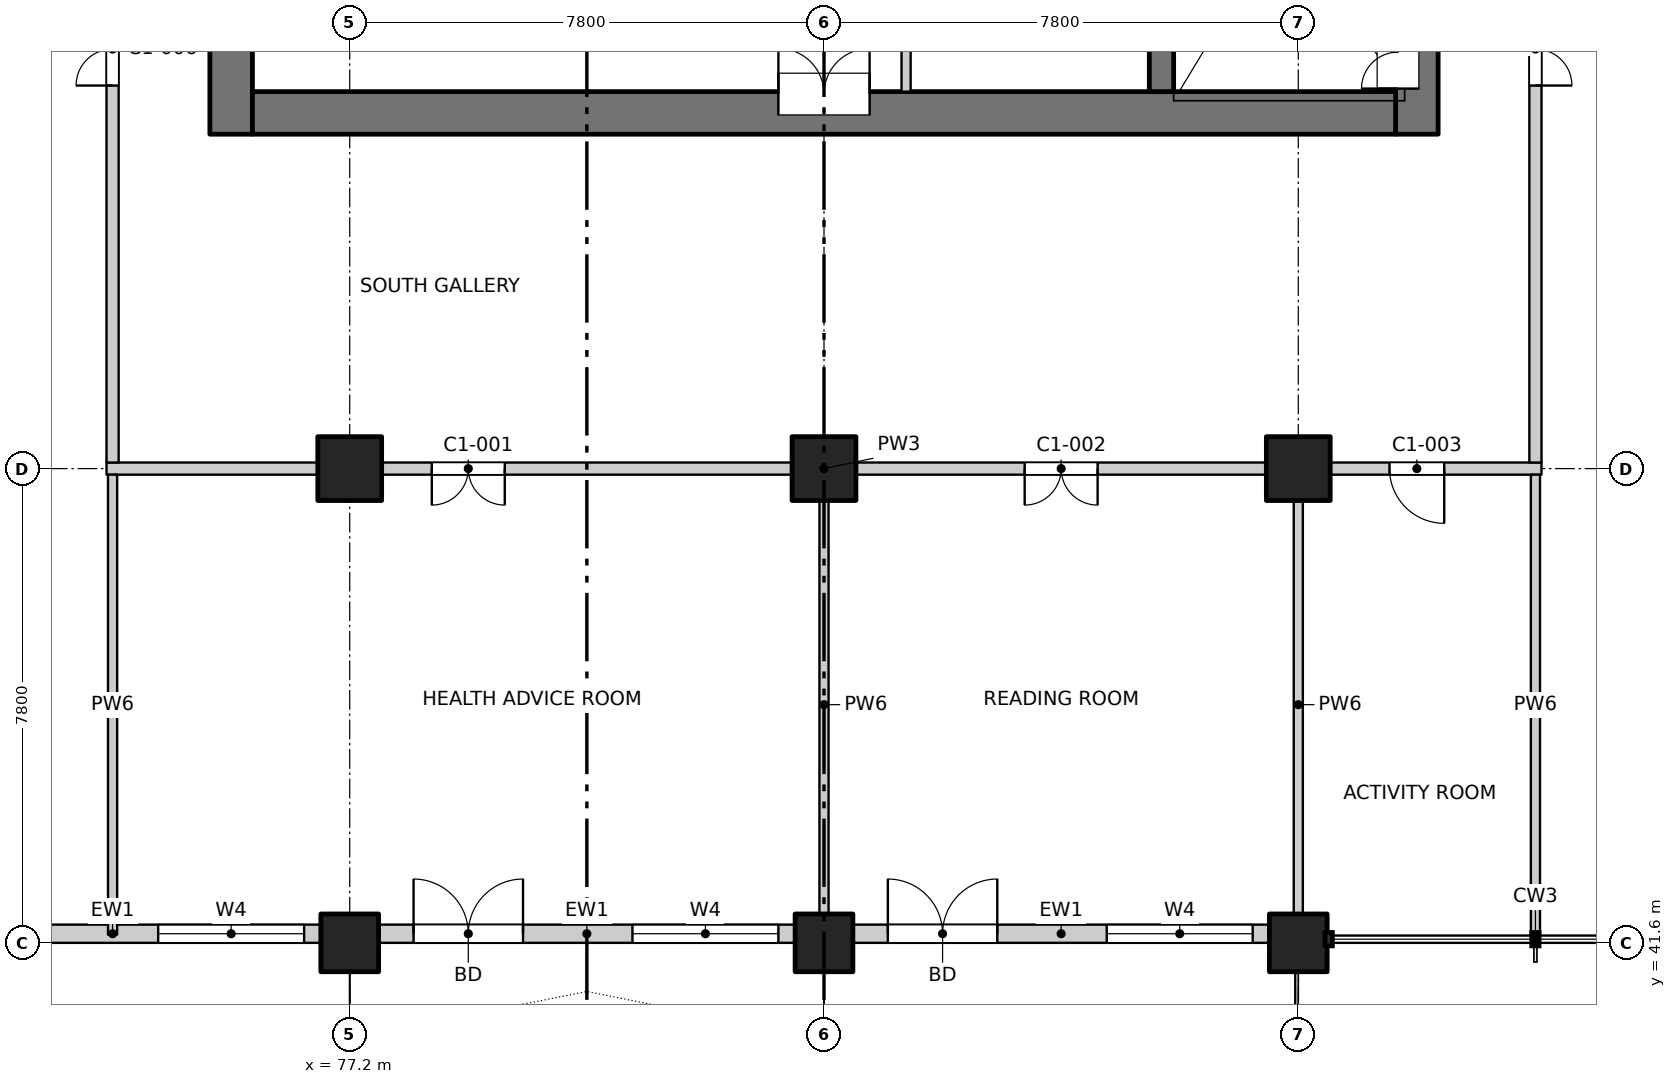
"""IFC4 building model, lengths in metres.
Left out: names, types, materials, properties, quantities, classifications, styles, units other than length and angle.
Written with IfcOpenShell. Run it as: python <this file> out.ifc"""

import sys

from ifc_helpers import new_model, si_unit, direction, frame, frame_2d, origin, origin_2d, place, context, subcontext, project, spatial, rectangle, extrude, element, fill, save


model = new_model("IFC4")
c1 = context("Model", 3, precision=1e-05, world=origin(), true_north=direction((0.0, 1.0)))
c2 = subcontext(c1, "Body", "Model", "MODEL_VIEW")
j1 = project(units=[si_unit("LENGTHUNIT", "METRE"), si_unit("PLANEANGLEUNIT", "RADIAN")], contexts=[c1])
p1 = place(None, origin())
s1 = spatial("IfcSite", under=j1, at=p1, CompositionType="ELEMENT")
p2 = place(p1, origin())
s2 = spatial("IfcBuilding", under=s1, at=p2, CompositionType="ELEMENT")
p3 = place(p2, frame((0.0, 0.0, 71.6)))
s3 = spatial("IfcBuildingStorey", under=s2, at=p3, CompositionType="ELEMENT", Elevation=71.6)
for number, where, z_axis, x_axis in (
    (1, (77.2, 41.6, -0.25), (0.0, 0.0, 1.0), (1.0, 0.0, 0.0)),
    (2, (85.0, 41.6, -0.25), (0.0, 0.0, 1.0), (1.0, 0.0, 0.0)),
    (3, (92.8, 41.6, -0.25), (0.0, 0.0, 1.0), (1.0, 0.0, 0.0)),
):
    element("IfcColumn", number, at=place(p3, frame(where, z_axis=z_axis, x_axis=x_axis)), inside=s3, PredefinedType="COLUMN", context=c2, shape_type="SweptSolid", body=[
        extrude(rectangle(XDim=0.95, YDim=0.95, at=origin_2d()), origin(), (0.0, 0.0, 1.0), 3.4),
    ])
for number, where, z_axis, x_axis in (
    (4, (77.2, 49.4, -0.25), (0.0, 0.0, 1.0), (1.0, 0.0, 0.0)),
    (5, (85.0, 49.4, -0.25), (0.0, 0.0, 1.0), (1.0, 0.0, 0.0)),
    (6, (92.8, 49.4, -0.25), (0.0, 0.0, 1.0), (1.0, 0.0, 0.0)),
):
    element("IfcColumn", number, at=place(p3, frame(where, z_axis=z_axis, x_axis=x_axis)), inside=s3, PredefinedType="COLUMN", context=c2, shape_type="SweptSolid", body=[
        extrude(rectangle(XDim=1.05, YDim=1.05, at=origin_2d()), origin(), (0.0, 0.0, 1.0), 3.4),
    ])
p4 = place(p3, frame((75.25, 54.9, -0.25), z_axis=(0.0, 0.0, 1.0), x_axis=(0.0, 1.0, 0.0)))
e7 = element("IfcWall", 7, at=p4, inside=s3, PredefinedType="SOLIDWALL", context=c2, shape_type="SweptSolid", body=[
    extrude(rectangle(XDim=22.4, YDim=0.7, at=frame_2d((11.2, 0.0))), origin(), (0.0, 0.0, 1.0), 3.4),
])
p5 = place(p4, frame((7.55, 0.0, 0.25)))
e8 = element("IfcOpeningElement", 8, at=p5, cuts=e7, PredefinedType="OPENING", context=c2, shape_type="SweptSolid", body=[
    extrude(rectangle(XDim=0.9, YDim=2.1, at=frame_2d((0.45, 1.05))), frame((0.0, 0.36, 0.0), z_axis=(0.0, -1.0, 0.0), x_axis=(1.0, 0.0, 0.0)), (0.0, 0.0, 1.0), 0.72),
])
p6 = place(p4, frame((10.85, 0.0, 0.25)))
e9 = element("IfcOpeningElement", 9, at=p6, cuts=e7, PredefinedType="OPENING", context=c2, shape_type="SweptSolid", body=[
    extrude(rectangle(XDim=0.9, YDim=2.1, at=frame_2d((0.45, 1.05))), frame((0.0, 0.36, 0.0), z_axis=(0.0, -1.0, 0.0), x_axis=(1.0, 0.0, 0.0)), (0.0, 0.0, 1.0), 0.72),
])
p7 = place(p4, frame((13.85, 0.0, 0.25)))
e10 = element("IfcOpeningElement", 10, at=p7, cuts=e7, PredefinedType="OPENING", context=c2, shape_type="SweptSolid", body=[
    extrude(rectangle(XDim=0.9, YDim=2.1, at=frame_2d((0.45, 1.05))), frame((0.0, 0.36, 0.0), z_axis=(0.0, -1.0, 0.0), x_axis=(1.0, 0.0, 0.0)), (0.0, 0.0, 1.0), 0.72),
])
p8 = place(p4, frame((16.85, 0.0, 0.25)))
e11 = element("IfcOpeningElement", 11, at=p8, cuts=e7, PredefinedType="OPENING", context=c2, shape_type="SweptSolid", body=[
    extrude(rectangle(XDim=0.9, YDim=2.1, at=frame_2d((0.45, 1.05))), frame((0.0, 0.36, 0.0), z_axis=(0.0, -1.0, 0.0), x_axis=(1.0, 0.0, 0.0)), (0.0, 0.0, 1.0), 0.72),
])
p9 = place(p4, frame((20.15, 0.0, 0.25)))
e12 = element("IfcOpeningElement", 12, at=p9, cuts=e7, PredefinedType="OPENING", context=c2, shape_type="SweptSolid", body=[
    extrude(rectangle(XDim=0.9, YDim=2.1, at=frame_2d((0.45, 1.05))), frame((0.0, 0.36, 0.0), z_axis=(0.0, -1.0, 0.0), x_axis=(1.0, 0.0, 0.0)), (0.0, 0.0, 1.0), 0.72),
])
p10 = place(p3, frame((94.75, 54.9, -0.25), z_axis=(0.0, 0.0, 1.0), x_axis=(0.0, 1.0, 0.0)))
e13 = element("IfcWall", 13, at=p10, inside=s3, PredefinedType="SOLIDWALL", context=c2, shape_type="SweptSolid", body=[
    extrude(rectangle(XDim=7.05, YDim=0.7, at=frame_2d((3.525, 0.0))), origin(), (0.0, 0.0, 1.0), 3.4),
])
p11 = place(p10, frame((0.75, 0.0, 0.25)))
e14 = element("IfcOpeningElement", 14, at=p11, cuts=e13, PredefinedType="OPENING", context=c2, shape_type="SweptSolid", body=[
    extrude(rectangle(XDim=1.2, YDim=2.1, at=frame_2d((0.6, 1.05))), frame((0.0, 0.36, 0.0), z_axis=(0.0, -1.0, 0.0), x_axis=(1.0, 0.0, 0.0)), (0.0, 0.0, 1.0), 0.72),
])
p12 = place(p3, frame((75.6, 55.25, -0.25), z_axis=(0.0, 0.0, 1.0), x_axis=(1.0, 0.0, 0.0)))
e15 = element("IfcWall", 15, at=p12, inside=s3, PredefinedType="SOLIDWALL", context=c2, shape_type="SweptSolid", body=[
    extrude(rectangle(XDim=18.8, YDim=0.7, at=frame_2d((9.4, 0.0))), origin(), (0.0, 0.0, 1.0), 3.4),
])
p13 = place(p12, frame((8.65, 0.0, 0.25)))
e16 = element("IfcOpeningElement", 16, at=p13, cuts=e15, PredefinedType="OPENING", context=c2, shape_type="SweptSolid", body=[
    extrude(rectangle(XDim=1.5, YDim=2.1, at=frame_2d((0.75, 1.05))), frame((0.0, 0.36, 0.0), z_axis=(0.0, -1.0, 0.0), x_axis=(1.0, 0.0, 0.0)), (0.0, 0.0, 1.0), 0.72),
])
p14 = place(p3, frame((90.55, 55.6, -0.25), z_axis=(0.0, 0.0, 1.0), x_axis=(0.0, 1.0, 0.0)))
e17 = element("IfcWall", 17, at=p14, inside=s3, PredefinedType="SOLIDWALL", context=c2, shape_type="SweptSolid", body=[
    extrude(rectangle(XDim=6.35, YDim=0.4, at=frame_2d((3.175, 0.0))), origin(), (0.0, 0.0, 1.0), 3.4),
])
p15 = place(p3, frame((69.875, 41.75, 0.0), z_axis=(0.0, 0.0, 1.0), x_axis=(1.0, 0.0, 0.0)))
e18 = element("IfcWall", 18, at=p15, inside=s3, PredefinedType="SOLIDWALL", context=c2, shape_type="SweptSolid", body=[
    extrude(rectangle(XDim=6.85, YDim=0.3, at=frame_2d((3.425, 0.0))), origin(), (0.0, 0.0, 1.0), 2.7),
])
p16 = place(p15, frame((0.575, 0.0, 0.0)))
e19 = element("IfcOpeningElement", 19, at=p16, cuts=e18, PredefinedType="OPENING", context=c2, shape_type="SweptSolid", body=[
    extrude(rectangle(XDim=1.8, YDim=2.4, at=frame_2d((0.9, 1.2))), frame((0.0, 0.16, 0.0), z_axis=(0.0, -1.0, 0.0), x_axis=(1.0, 0.0, 0.0)), (0.0, 0.0, 1.0), 0.32),
])
p17 = place(p15, frame((4.175, 0.0, 0.6)))
e20 = element("IfcOpeningElement", 20, at=p17, cuts=e18, PredefinedType="OPENING", context=c2, shape_type="SweptSolid", body=[
    extrude(rectangle(XDim=2.4, YDim=2.1, at=frame_2d((1.2, 1.05))), frame((0.0, 0.16, 0.0), z_axis=(0.0, -1.0, 0.0), x_axis=(1.0, 0.0, 0.0)), (0.0, 0.0, 1.0), 0.32),
])
p18 = place(p3, frame((77.675, 41.75, 0.0), z_axis=(0.0, 0.0, 1.0), x_axis=(1.0, 0.0, 0.0)))
e21 = element("IfcWall", 21, at=p18, inside=s3, PredefinedType="SOLIDWALL", context=c2, shape_type="SweptSolid", body=[
    extrude(rectangle(XDim=6.85, YDim=0.3, at=frame_2d((3.425, 0.0))), origin(), (0.0, 0.0, 1.0), 2.7),
])
p19 = place(p18, frame((0.575, 0.0, 0.0)))
e22 = element("IfcOpeningElement", 22, at=p19, cuts=e21, PredefinedType="OPENING", context=c2, shape_type="SweptSolid", body=[
    extrude(rectangle(XDim=1.8, YDim=2.4, at=frame_2d((0.9, 1.2))), frame((0.0, 0.16, 0.0), z_axis=(0.0, -1.0, 0.0), x_axis=(1.0, 0.0, 0.0)), (0.0, 0.0, 1.0), 0.32),
])
p20 = place(p18, frame((4.175, 0.0, 0.6)))
e23 = element("IfcOpeningElement", 23, at=p20, cuts=e21, PredefinedType="OPENING", context=c2, shape_type="SweptSolid", body=[
    extrude(rectangle(XDim=2.4, YDim=2.1, at=frame_2d((1.2, 1.05))), frame((0.0, 0.16, 0.0), z_axis=(0.0, -1.0, 0.0), x_axis=(1.0, 0.0, 0.0)), (0.0, 0.0, 1.0), 0.32),
])
p21 = place(p3, frame((85.475, 41.75, 0.0), z_axis=(0.0, 0.0, 1.0), x_axis=(1.0, 0.0, 0.0)))
e24 = element("IfcWall", 24, at=p21, inside=s3, PredefinedType="SOLIDWALL", context=c2, shape_type="SweptSolid", body=[
    extrude(rectangle(XDim=6.85, YDim=0.3, at=frame_2d((3.425, 0.0))), origin(), (0.0, 0.0, 1.0), 2.7),
])
p22 = place(p21, frame((0.575, 0.0, 0.0)))
e25 = element("IfcOpeningElement", 25, at=p22, cuts=e24, PredefinedType="OPENING", context=c2, shape_type="SweptSolid", body=[
    extrude(rectangle(XDim=1.8, YDim=2.4, at=frame_2d((0.9, 1.2))), frame((0.0, 0.16, 0.0), z_axis=(0.0, -1.0, 0.0), x_axis=(1.0, 0.0, 0.0)), (0.0, 0.0, 1.0), 0.32),
])
p23 = place(p21, frame((4.175, 0.0, 0.6)))
e26 = element("IfcOpeningElement", 26, at=p23, cuts=e24, PredefinedType="OPENING", context=c2, shape_type="SweptSolid", body=[
    extrude(rectangle(XDim=2.4, YDim=2.1, at=frame_2d((1.2, 1.05))), frame((0.0, 0.16, 0.0), z_axis=(0.0, -1.0, 0.0), x_axis=(1.0, 0.0, 0.0)), (0.0, 0.0, 1.0), 0.32),
])
p24 = place(p3, frame((73.2, 49.4, 0.0), z_axis=(0.0, 0.0, 1.0), x_axis=(1.0, 0.0, 0.0)))
e27 = element("IfcWall", 27, at=p24, inside=s3, PredefinedType="PARTITIONING", context=c2, shape_type="SweptSolid", body=[
    extrude(rectangle(XDim=23.6, YDim=0.2, at=frame_2d((11.8, 0.0))), origin(), (0.0, 0.0, 1.0), 3.15),
])
p25 = place(p24, frame((5.35, 0.0, 0.0)))
e28 = element("IfcOpeningElement", 28, at=p25, cuts=e27, PredefinedType="OPENING", context=c2, shape_type="SweptSolid", body=[
    extrude(rectangle(XDim=1.2, YDim=2.1, at=frame_2d((0.6, 1.05))), frame((0.0, 0.11, 0.0), z_axis=(0.0, -1.0, 0.0), x_axis=(1.0, 0.0, 0.0)), (0.0, 0.0, 1.0), 0.22),
])
p26 = place(p24, frame((15.1, 0.0, 0.0)))
e29 = element("IfcOpeningElement", 29, at=p26, cuts=e27, PredefinedType="OPENING", context=c2, shape_type="SweptSolid", body=[
    extrude(rectangle(XDim=1.2, YDim=2.1, at=frame_2d((0.6, 1.05))), frame((0.0, 0.11, 0.0), z_axis=(0.0, -1.0, 0.0), x_axis=(1.0, 0.0, 0.0)), (0.0, 0.0, 1.0), 0.22),
])
p27 = place(p24, frame((21.1, 0.0, 0.0)))
e30 = element("IfcOpeningElement", 30, at=p27, cuts=e27, PredefinedType="OPENING", context=c2, shape_type="SweptSolid", body=[
    extrude(rectangle(XDim=0.9, YDim=2.1, at=frame_2d((0.45, 1.05))), frame((0.0, 0.11, 0.0), z_axis=(0.0, -1.0, 0.0), x_axis=(1.0, 0.0, 0.0)), (0.0, 0.0, 1.0), 0.22),
])
p28 = place(p3, frame((73.3, 41.735, 0.0), z_axis=(0.0, 0.0, 1.0), x_axis=(0.0, 1.0, 0.0)))
e31 = element("IfcWall", 31, at=p28, inside=s3, PredefinedType="PARTITIONING", context=c2, shape_type="SweptSolid", body=[
    extrude(rectangle(XDim=7.565, YDim=0.15, at=frame_2d((3.782, 0.0))), origin(), (0.0, 0.0, 1.0), 3.15),
])
p29 = place(p3, frame((73.3, 49.5, 0.0), z_axis=(0.0, 0.0, 1.0), x_axis=(0.0, 1.0, 0.0)))
e32 = element("IfcWall", 32, at=p29, inside=s3, PredefinedType="PARTITIONING", context=c2, shape_type="SweptSolid", body=[
    extrude(rectangle(XDim=34.9, YDim=0.2, at=frame_2d((17.45, 0.0))), origin(), (0.0, 0.0, 1.0), 3.15),
])
p30 = place(p29, frame((6.2, 0.0, 0.0)))
e33 = element("IfcOpeningElement", 33, at=p30, cuts=e32, PredefinedType="OPENING", context=c2, shape_type="SweptSolid", body=[
    extrude(rectangle(XDim=1.2, YDim=2.1, at=frame_2d((0.6, 1.05))), frame((0.0, 0.11, 0.0), z_axis=(0.0, -1.0, 0.0), x_axis=(1.0, 0.0, 0.0)), (0.0, 0.0, 1.0), 0.22),
])
p31 = place(p29, frame((9.05, 0.0, 0.0)))
e34 = element("IfcOpeningElement", 34, at=p31, cuts=e32, PredefinedType="OPENING", context=c2, shape_type="SweptSolid", body=[
    extrude(rectangle(XDim=1.2, YDim=2.1, at=frame_2d((0.6, 1.05))), frame((0.0, 0.11, 0.0), z_axis=(0.0, -1.0, 0.0), x_axis=(1.0, 0.0, 0.0)), (0.0, 0.0, 1.0), 0.22),
])
p32 = place(p29, frame((24.65, 0.0, 0.0)))
e35 = element("IfcOpeningElement", 35, at=p32, cuts=e32, PredefinedType="OPENING", context=c2, shape_type="SweptSolid", body=[
    extrude(rectangle(XDim=1.2, YDim=2.1, at=frame_2d((0.6, 1.05))), frame((0.0, 0.11, 0.0), z_axis=(0.0, -1.0, 0.0), x_axis=(1.0, 0.0, 0.0)), (0.0, 0.0, 1.0), 0.22),
])
p33 = place(p29, frame((33.579, 0.0, 0.0)))
e36 = element("IfcOpeningElement", 36, at=p33, cuts=e32, PredefinedType="OPENING", context=c2, shape_type="SweptSolid", body=[
    extrude(rectangle(XDim=1.2, YDim=2.1, at=frame_2d((0.6, 1.05))), frame((0.0, 0.11, 0.0), z_axis=(0.0, -1.0, 0.0), x_axis=(1.0, 0.0, 0.0)), (0.0, 0.0, 1.0), 0.22),
])
p34 = place(p3, frame((85.0, 41.735, 0.0), z_axis=(0.0, 0.0, 1.0), x_axis=(0.0, 1.0, 0.0)))
e37 = element("IfcWall", 37, at=p34, inside=s3, PredefinedType="PARTITIONING", context=c2, shape_type="SweptSolid", body=[
    extrude(rectangle(XDim=7.565, YDim=0.15, at=frame_2d((3.782, 0.0))), origin(), (0.0, 0.0, 1.0), 2.55),
])
p35 = place(p3, frame((86.35, 55.6, 0.0), z_axis=(0.0, 0.0, 1.0), x_axis=(0.0, 1.0, 0.0)))
e38 = element("IfcWall", 38, at=p35, inside=s3, PredefinedType="PARTITIONING", context=c2, shape_type="SweptSolid", body=[
    extrude(rectangle(XDim=5.425, YDim=0.15, at=frame_2d((2.712, 0.0))), origin(), (0.0, 0.0, 1.0), 3.15),
])
p36 = place(p35, frame((2.1, 0.0, 0.0)))
e39 = element("IfcOpeningElement", 39, at=p36, cuts=e38, PredefinedType="OPENING", context=c2, shape_type="SweptSolid", body=[
    extrude(rectangle(XDim=0.9, YDim=2.1, at=frame_2d((0.45, 1.05))), frame((0.0, 0.085, 0.0), z_axis=(0.0, -1.0, 0.0), x_axis=(1.0, 0.0, 0.0)), (0.0, 0.0, 1.0), 0.17),
])
p37 = place(p3, frame((92.8, 41.735, 0.0), z_axis=(0.0, 0.0, 1.0), x_axis=(0.0, 1.0, 0.0)))
e40 = element("IfcWall", 40, at=p37, inside=s3, PredefinedType="PARTITIONING", context=c2, shape_type="SweptSolid", body=[
    extrude(rectangle(XDim=7.565, YDim=0.15, at=frame_2d((3.782, 0.0))), origin(), (0.0, 0.0, 1.0), 2.55),
])
p38 = place(p3, frame((96.7, 41.735, 0.0), z_axis=(0.0, 0.0, 1.0), x_axis=(0.0, 1.0, 0.0)))
e41 = element("IfcWall", 41, at=p38, inside=s3, PredefinedType="PARTITIONING", context=c2, shape_type="SweptSolid", body=[
    extrude(rectangle(XDim=7.565, YDim=0.15, at=frame_2d((3.782, 0.0))), origin(), (0.0, 0.0, 1.0), 3.15),
])
p39 = place(p3, frame((96.7, 49.5, 0.0), z_axis=(0.0, 0.0, 1.0), x_axis=(0.0, 1.0, 0.0)))
e42 = element("IfcWall", 42, at=p39, inside=s3, PredefinedType="PARTITIONING", context=c2, shape_type="SweptSolid", body=[
    extrude(rectangle(XDim=34.9, YDim=0.2, at=frame_2d((17.45, 0.0))), origin(), (0.0, 0.0, 1.0), 3.15),
])
p40 = place(p39, frame((6.2, 0.0, 0.0)))
e43 = element("IfcOpeningElement", 43, at=p40, cuts=e42, PredefinedType="OPENING", context=c2, shape_type="SweptSolid", body=[
    extrude(rectangle(XDim=1.2, YDim=2.1, at=frame_2d((0.6, 1.05))), frame((0.0, 0.11, 0.0), z_axis=(0.0, -1.0, 0.0), x_axis=(1.0, 0.0, 0.0)), (0.0, 0.0, 1.0), 0.22),
])
p41 = place(p39, frame((12.95, 0.0, 0.0)))
e44 = element("IfcOpeningElement", 44, at=p41, cuts=e42, PredefinedType="OPENING", context=c2, shape_type="SweptSolid", body=[
    extrude(rectangle(XDim=1.2, YDim=2.1, at=frame_2d((0.6, 1.05))), frame((0.0, 0.11, 0.0), z_axis=(0.0, -1.0, 0.0), x_axis=(1.0, 0.0, 0.0)), (0.0, 0.0, 1.0), 0.22),
])
p42 = place(p39, frame((20.75, 0.0, 0.0)))
e45 = element("IfcOpeningElement", 45, at=p42, cuts=e42, PredefinedType="OPENING", context=c2, shape_type="SweptSolid", body=[
    extrude(rectangle(XDim=1.2, YDim=2.1, at=frame_2d((0.6, 1.05))), frame((0.0, 0.11, 0.0), z_axis=(0.0, -1.0, 0.0), x_axis=(1.0, 0.0, 0.0)), (0.0, 0.0, 1.0), 0.22),
])
p43 = place(p39, frame((28.55, 0.0, 0.0)))
e46 = element("IfcOpeningElement", 46, at=p43, cuts=e42, PredefinedType="OPENING", context=c2, shape_type="SweptSolid", body=[
    extrude(rectangle(XDim=1.2, YDim=2.1, at=frame_2d((0.6, 1.05))), frame((0.0, 0.11, 0.0), z_axis=(0.0, -1.0, 0.0), x_axis=(1.0, 0.0, 0.0)), (0.0, 0.0, 1.0), 0.22),
])
p44 = place(p17, origin())
e47 = element("IfcWindow", 47, at=p44, inside=s3, PartitioningType="SINGLE_PANEL", PredefinedType="WINDOW", context=c2, shape_type="SweptSolid", body=[
    extrude(rectangle(XDim=2.4, YDim=2.1, at=frame_2d((1.2, 1.05))), frame((0.0, 0.03, 0.0), z_axis=(0.0, -1.0, 0.0), x_axis=(1.0, 0.0, 0.0)), (0.0, 0.0, 1.0), 0.06),
])
fill(e20, e47)
p45 = place(p19, origin())
e48 = element("IfcDoor", 48, at=p45, inside=s3, OperationType="DOUBLE_DOOR_SINGLE_SWING", PredefinedType="DOOR", context=c2, shape_type="SweptSolid", body=[
    extrude(rectangle(XDim=1.8, YDim=2.4, at=frame_2d((0.9, 1.2))), frame((0.0, 0.025, 0.0), z_axis=(0.0, -1.0, 0.0), x_axis=(1.0, 0.0, 0.0)), (0.0, 0.0, 1.0), 0.05),
])
fill(e22, e48)
p46 = place(p20, origin())
e49 = element("IfcWindow", 49, at=p46, inside=s3, PartitioningType="SINGLE_PANEL", PredefinedType="WINDOW", context=c2, shape_type="SweptSolid", body=[
    extrude(rectangle(XDim=2.4, YDim=2.1, at=frame_2d((1.2, 1.05))), frame((0.0, 0.03, 0.0), z_axis=(0.0, -1.0, 0.0), x_axis=(1.0, 0.0, 0.0)), (0.0, 0.0, 1.0), 0.06),
])
fill(e23, e49)
p47 = place(p22, origin())
e50 = element("IfcDoor", 50, at=p47, inside=s3, OperationType="DOUBLE_DOOR_SINGLE_SWING", PredefinedType="DOOR", context=c2, shape_type="SweptSolid", body=[
    extrude(rectangle(XDim=1.8, YDim=2.4, at=frame_2d((0.9, 1.2))), frame((0.0, 0.025, 0.0), z_axis=(0.0, -1.0, 0.0), x_axis=(1.0, 0.0, 0.0)), (0.0, 0.0, 1.0), 0.05),
])
fill(e25, e50)
p48 = place(p23, origin())
e51 = element("IfcWindow", 51, at=p48, inside=s3, PartitioningType="SINGLE_PANEL", PredefinedType="WINDOW", context=c2, shape_type="SweptSolid", body=[
    extrude(rectangle(XDim=2.4, YDim=2.1, at=frame_2d((1.2, 1.05))), frame((0.0, 0.03, 0.0), z_axis=(0.0, -1.0, 0.0), x_axis=(1.0, 0.0, 0.0)), (0.0, 0.0, 1.0), 0.06),
])
fill(e26, e51)
p49 = place(p25, origin())
e52 = element("IfcDoor", 52, at=p49, inside=s3, OperationType="DOUBLE_DOOR_SINGLE_SWING", PredefinedType="DOOR", context=c2, shape_type="SweptSolid", body=[
    extrude(rectangle(XDim=1.2, YDim=2.1, at=frame_2d((0.6, 1.05))), frame((0.0, 0.025, 0.0), z_axis=(0.0, -1.0, 0.0), x_axis=(1.0, 0.0, 0.0)), (0.0, 0.0, 1.0), 0.05),
])
fill(e28, e52)
p50 = place(p26, origin())
e53 = element("IfcDoor", 53, at=p50, inside=s3, OperationType="DOUBLE_DOOR_SINGLE_SWING", PredefinedType="DOOR", context=c2, shape_type="SweptSolid", body=[
    extrude(rectangle(XDim=1.2, YDim=2.1, at=frame_2d((0.6, 1.05))), frame((0.0, 0.025, 0.0), z_axis=(0.0, -1.0, 0.0), x_axis=(1.0, 0.0, 0.0)), (0.0, 0.0, 1.0), 0.05),
])
fill(e29, e53)
p51 = place(p27, origin())
e54 = element("IfcDoor", 54, at=p51, inside=s3, OperationType="SINGLE_SWING_LEFT", PredefinedType="DOOR", context=c2, shape_type="SweptSolid", body=[
    extrude(rectangle(XDim=0.9, YDim=2.1, at=frame_2d((0.45, 1.05))), frame((0.0, 0.025, 0.0), z_axis=(0.0, -1.0, 0.0), x_axis=(1.0, 0.0, 0.0)), (0.0, 0.0, 1.0), 0.05),
])
fill(e30, e54)
p52 = place(p13, origin())
e55 = element("IfcDoor", 55, at=p52, inside=s3, OperationType="DOUBLE_DOOR_SINGLE_SWING", PredefinedType="DOOR", context=c2, shape_type="SweptSolid", body=[
    extrude(rectangle(XDim=1.5, YDim=2.1, at=frame_2d((0.75, 1.05))), frame((0.0, 0.335, 0.0), z_axis=(0.0, -1.0, 0.0), x_axis=(1.0, 0.0, 0.0)), (0.0, 0.0, 1.0), 0.05),
])
fill(e16, e55)
p53 = place(p11, origin())
e56 = element("IfcDoor", 56, at=p53, inside=s3, OperationType="DOUBLE_DOOR_SINGLE_SWING", PredefinedType="DOOR", context=c2, shape_type="SweptSolid", body=[
    extrude(rectangle(XDim=1.2, YDim=2.1, at=frame_2d((0.6, 1.05))), frame((0.0, 0.335, 0.0), z_axis=(0.0, -1.0, 0.0), x_axis=(1.0, 0.0, 0.0)), (0.0, 0.0, 1.0), 0.05),
])
fill(e14, e56)
p54 = place(p30, origin())
e57 = element("IfcDoor", 57, at=p54, inside=s3, OperationType="DOUBLE_DOOR_SINGLE_SWING", PredefinedType="DOOR", context=c2, shape_type="SweptSolid", body=[
    extrude(rectangle(XDim=1.2, YDim=2.1, at=frame_2d((0.6, 1.05))), frame((0.0, 0.025, 0.0), z_axis=(0.0, -1.0, 0.0), x_axis=(1.0, 0.0, 0.0)), (0.0, 0.0, 1.0), 0.05),
])
fill(e33, e57)
p55 = place(p40, origin())
e58 = element("IfcDoor", 58, at=p55, inside=s3, OperationType="DOUBLE_DOOR_SINGLE_SWING", PredefinedType="DOOR", context=c2, shape_type="SweptSolid", body=[
    extrude(rectangle(XDim=1.2, YDim=2.1, at=frame_2d((0.6, 1.05))), frame((0.0, 0.025, 0.0), z_axis=(0.0, -1.0, 0.0), x_axis=(1.0, 0.0, 0.0)), (0.0, 0.0, 1.0), 0.05),
])
fill(e43, e58)
save(model, sys.argv[1])
